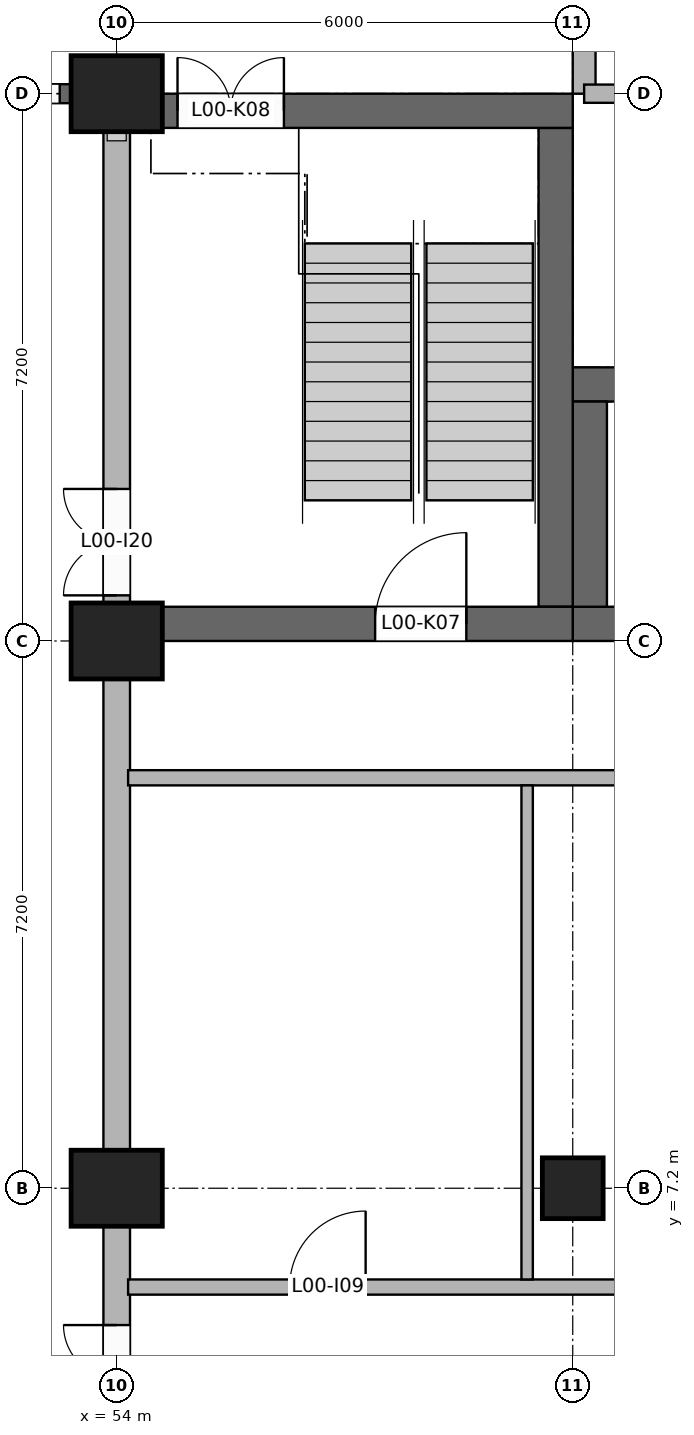
"""IFC4 building model, lengths in metres.
Left out: names, types, materials, properties, quantities, classifications, styles, units other than length and angle.
Written with IfcOpenShell. Run it as: python <this file> out.ifc"""

import sys

from ifc_helpers import new_model, si_unit, direction, frame, frame_2d, origin, origin_2d, place, context, subcontext, project, spatial, rectangle, extrude, element, fill, save


model = new_model("IFC4")
c1 = context("Model", 3, precision=1e-05, world=origin(), true_north=direction((0.0, 1.0)))
c2 = subcontext(c1, "Body", "Model", "MODEL_VIEW")
j1 = project(units=[si_unit("LENGTHUNIT", "METRE"), si_unit("PLANEANGLEUNIT", "RADIAN")], contexts=[c1])
p1 = place(None, origin())
s1 = spatial("IfcSite", under=j1, at=p1, CompositionType="ELEMENT")
p2 = place(p1, origin())
s2 = spatial("IfcBuilding", under=s1, at=p2, CompositionType="ELEMENT")
p3 = place(p2, origin())
s3 = spatial("IfcBuildingStorey", under=s2, at=p3, CompositionType="ELEMENT", Elevation=0.0)
p4 = place(p3, frame((54.6, 14.625, 0.0), z_axis=(0.0, 0.0, 1.0), x_axis=(1.0, 0.0, 0.0)))
e1 = element("IfcWall", 1, at=p4, inside=s3, PredefinedType="SHEAR", context=c2, shape_type="SweptSolid", body=[
    extrude(rectangle(XDim=5.4, YDim=0.45, at=frame_2d((2.7, 0.0))), origin(), (0.0, 0.0, 1.0), 4.0),
])
p5 = place(p4, frame((2.8, 0.0, 0.0)))
e2 = element("IfcOpeningElement", 2, at=p5, cuts=e1, PredefinedType="OPENING", context=c2, shape_type="SweptSolid", body=[
    extrude(rectangle(XDim=1.2, YDim=2.1, at=frame_2d((0.6, 1.05))), frame((0.0, 0.235, 0.0), z_axis=(0.0, -1.0, 0.0), x_axis=(1.0, 0.0, 0.0)), (0.0, 0.0, 1.0), 0.47),
])
p6 = place(p3, frame((54.6, 21.375, 0.0), z_axis=(0.0, 0.0, 1.0), x_axis=(1.0, 0.0, 0.0)))
e3 = element("IfcWall", 3, at=p6, inside=s3, PredefinedType="SHEAR", context=c2, shape_type="SweptSolid", body=[
    extrude(rectangle(XDim=5.4, YDim=0.45, at=frame_2d((2.7, 0.0))), origin(), (0.0, 0.0, 1.0), 4.0),
])
p7 = place(p6, frame((0.2, 0.0, 0.0)))
e4 = element("IfcOpeningElement", 4, at=p7, cuts=e3, PredefinedType="OPENING", context=c2, shape_type="SweptSolid", body=[
    extrude(rectangle(XDim=1.4, YDim=2.1, at=frame_2d((0.7, 1.05))), frame((0.0, 0.235, 0.0), z_axis=(0.0, -1.0, 0.0), x_axis=(1.0, 0.0, 0.0)), (0.0, 0.0, 1.0), 0.47),
])
p8 = place(p3, frame((59.775, 14.85, 0.0), z_axis=(0.0, 0.0, 1.0), x_axis=(0.0, 1.0, 0.0)))
e5 = element("IfcWall", 5, at=p8, inside=s3, PredefinedType="SHEAR", context=c2, shape_type="SweptSolid", body=[
    extrude(rectangle(XDim=6.3, YDim=0.45, at=frame_2d((3.15, 0.0))), origin(), (0.0, 0.0, 1.0), 4.0),
])
p9 = place(p3, frame((60.0, 14.625, 0.0), z_axis=(0.0, 0.0, 1.0), x_axis=(1.0, 0.0, 0.0)))
e6 = element("IfcWall", 6, at=p9, inside=s3, PredefinedType="SHEAR", context=c2, shape_type="SweptSolid", body=[
    extrude(rectangle(XDim=3.0, YDim=0.45, at=frame_2d((1.5, 0.0))), origin(), (0.0, 0.0, 1.0), 4.2),
])
p10 = place(p9, frame((0.95, 0.0, 0.0)))
e7 = element("IfcOpeningElement", 7, at=p10, cuts=e6, PredefinedType="OPENING", context=c2, shape_type="SweptSolid", body=[
    extrude(rectangle(XDim=1.1, YDim=2.1, at=frame_2d((0.55, 1.05))), frame((0.0, 0.235, 0.0), z_axis=(0.0, -1.0, 0.0), x_axis=(1.0, 0.0, 0.0)), (0.0, 0.0, 1.0), 0.47),
])
p11 = place(p3, frame((60.0, 17.775, 0.0), z_axis=(0.0, 0.0, 1.0), x_axis=(1.0, 0.0, 0.0)))
e8 = element("IfcWall", 8, at=p11, inside=s3, PredefinedType="SHEAR", context=c2, shape_type="SweptSolid", body=[
    extrude(rectangle(XDim=3.0, YDim=0.45, at=frame_2d((1.5, 0.0))), origin(), (0.0, 0.0, 1.0), 4.2),
])
for number, where, z_axis, x_axis in (
    (9, (60.0, 14.625, -1.7), (0.0, 0.0, 1.0), (1.0, 0.0, 0.0)),
    (10, (60.0, 17.775, -1.7), (0.0, 0.0, 1.0), (1.0, 0.0, 0.0)),
):
    element("IfcWall", number, at=place(p3, frame(where, z_axis=z_axis, x_axis=x_axis)), inside=s3, PredefinedType="SHEAR", context=c2, shape_type="SweptSolid", body=[
        extrude(rectangle(XDim=3.0, YDim=0.45, at=frame_2d((1.5, 0.0))), origin(), (0.0, 0.0, 1.0), 1.7),
    ])
p12 = place(p3, frame((60.225, 14.85, -1.7), z_axis=(0.0, 0.0, 1.0), x_axis=(0.0, 1.0, 0.0)))
e11 = element("IfcWall", 11, at=p12, inside=s3, PredefinedType="SHEAR", context=c2, shape_type="SweptSolid", body=[
    extrude(rectangle(XDim=2.7, YDim=0.45, at=frame_2d((1.35, 0.0))), origin(), (0.0, 0.0, 1.0), 1.7),
])
p13 = place(p3, frame((60.0, 7.2, -0.25), z_axis=(0.0, 0.0, 1.0), x_axis=(1.0, 0.0, 0.0)))
e12 = element("IfcColumn", 12, at=p13, inside=s3, PredefinedType="COLUMN", context=c2, shape_type="SweptSolid", body=[
    extrude(rectangle(XDim=0.8, YDim=0.8, at=origin_2d()), origin(), (0.0, 0.0, 1.0), 4.25),
])
for number, where, z_axis, x_axis in (
    (13, (54.0, 7.2, -0.25), (0.0, 0.0, 1.0), (1.0, 0.0, 0.0)),
    (14, (54.0, 14.4, -0.25), (0.0, 0.0, 1.0), (1.0, 0.0, 0.0)),
    (15, (54.0, 21.6, -0.25), (0.0, 0.0, 1.0), (1.0, 0.0, 0.0)),
):
    element("IfcColumn", number, at=place(p3, frame(where, z_axis=z_axis, x_axis=x_axis)), inside=s3, PredefinedType="COLUMN", context=c2, shape_type="SweptSolid", body=[
        extrude(rectangle(XDim=1.2, YDim=1.0, at=origin_2d()), origin(), (0.0, 0.0, 1.0), 4.45),
    ])
p14 = place(p3, frame((54.0, 0.5, 0.0), z_axis=(0.0, 0.0, 1.0), x_axis=(0.0, 1.0, 0.0)))
e16 = element("IfcWall", 16, at=p14, inside=s3, PredefinedType="SOLIDWALL", context=c2, shape_type="SweptSolid", body=[
    extrude(rectangle(XDim=6.2, YDim=0.35, at=frame_2d((3.1, 0.0))), origin(), (0.0, 0.0, 1.0), 4.2),
])
p15 = place(p14, frame((3.5, 0.0, 0.0)))
e17 = element("IfcOpeningElement", 17, at=p15, cuts=e16, PredefinedType="OPENING", context=c2, shape_type="SweptSolid", body=[
    extrude(rectangle(XDim=1.4, YDim=2.1, at=frame_2d((0.7, 1.05))), frame((0.0, 0.185, 0.0), z_axis=(0.0, -1.0, 0.0), x_axis=(1.0, 0.0, 0.0)), (0.0, 0.0, 1.0), 0.37),
])
p16 = place(p3, frame((54.0, 7.7, 0.0), z_axis=(0.0, 0.0, 1.0), x_axis=(0.0, 1.0, 0.0)))
e18 = element("IfcWall", 18, at=p16, inside=s3, PredefinedType="SOLIDWALL", context=c2, shape_type="SweptSolid", body=[
    extrude(rectangle(XDim=6.2, YDim=0.35, at=frame_2d((3.1, 0.0))), origin(), (0.0, 0.0, 1.0), 4.2),
])
p17 = place(p3, frame((54.0, 14.9, 0.0), z_axis=(0.0, 0.0, 1.0), x_axis=(0.0, 1.0, 0.0)))
e19 = element("IfcWall", 19, at=p17, inside=s3, PredefinedType="SOLIDWALL", context=c2, shape_type="SweptSolid", body=[
    extrude(rectangle(XDim=6.2, YDim=0.35, at=frame_2d((3.1, 0.0))), origin(), (0.0, 0.0, 1.0), 4.2),
])
p18 = place(p17, frame((0.1, 0.0, 0.0)))
e20 = element("IfcOpeningElement", 20, at=p18, cuts=e19, PredefinedType="OPENING", context=c2, shape_type="SweptSolid", body=[
    extrude(rectangle(XDim=1.4, YDim=2.1, at=frame_2d((0.7, 1.05))), frame((0.0, 0.185, 0.0), z_axis=(0.0, -1.0, 0.0), x_axis=(1.0, 0.0, 0.0)), (0.0, 0.0, 1.0), 0.37),
])
p19 = place(p3, frame((48.6, 21.6, 0.0), z_axis=(0.0, 0.0, 1.0), x_axis=(1.0, 0.0, 0.0)))
e21 = element("IfcWall", 21, at=p19, inside=s3, PredefinedType="SOLIDWALL", context=c2, shape_type="SweptSolid", body=[
    extrude(rectangle(XDim=4.8, YDim=0.25, at=frame_2d((2.4, 0.0))), origin(), (0.0, 0.0, 1.0), 5.4),
])
p20 = place(p19, frame((0.15, 0.0, 0.0)))
e22 = element("IfcOpeningElement", 22, at=p20, cuts=e21, PredefinedType="OPENING", context=c2, shape_type="SweptSolid", body=[
    extrude(rectangle(XDim=4.5, YDim=4.8, at=frame_2d((2.25, 2.4))), frame((0.0, 0.135, 0.0), z_axis=(0.0, -1.0, 0.0), x_axis=(1.0, 0.0, 0.0)), (0.0, 0.0, 1.0), 0.27),
])
p21 = place(p3, frame((60.15, 21.6, 0.0), z_axis=(0.0, 0.0, 1.0), x_axis=(0.0, 1.0, 0.0)))
e23 = element("IfcWall", 23, at=p21, inside=s3, PredefinedType="SOLIDWALL", context=c2, shape_type="SweptSolid", body=[
    extrude(rectangle(XDim=6.1, YDim=0.3, at=frame_2d((3.05, 0.0))), origin(), (0.0, 0.0, 1.0), 3.2),
])
p22 = place(p21, frame((0.625, 0.0, 0.0)))
e24 = element("IfcOpeningElement", 24, at=p22, cuts=e23, PredefinedType="OPENING", context=c2, shape_type="SweptSolid", body=[
    extrude(rectangle(XDim=1.8, YDim=2.4, at=frame_2d((0.9, 1.2))), frame((0.0, 0.16, 0.0), z_axis=(0.0, -1.0, 0.0), x_axis=(1.0, 0.0, 0.0)), (0.0, 0.0, 1.0), 0.32),
])
p23 = place(p3, frame((59.4, 6.0, 0.0), z_axis=(0.0, 0.0, 1.0), x_axis=(0.0, 1.0, 0.0)))
e25 = element("IfcWall", 25, at=p23, inside=s3, PredefinedType="PARTITIONING", context=c2, shape_type="SweptSolid", body=[
    extrude(rectangle(XDim=6.5, YDim=0.15, at=frame_2d((3.25, 0.0))), origin(), (0.0, 0.0, 1.0), 3.2),
])
p24 = place(p3, frame((54.15, 5.9, 0.0), z_axis=(0.0, 0.0, 1.0), x_axis=(1.0, 0.0, 0.0)))
e26 = element("IfcWall", 26, at=p24, inside=s3, PredefinedType="PARTITIONING", context=c2, shape_type="SweptSolid", body=[
    extrude(rectangle(XDim=10.25, YDim=0.2, at=frame_2d((5.125, 0.0))), origin(), (0.0, 0.0, 1.0), 3.1),
])
p25 = place(p24, frame((2.125, 0.0, 0.0)))
e27 = element("IfcOpeningElement", 27, at=p25, cuts=e26, PredefinedType="OPENING", context=c2, shape_type="SweptSolid", body=[
    extrude(rectangle(XDim=1.0, YDim=2.1, at=frame_2d((0.5, 1.05))), frame((0.0, 0.11, 0.0), z_axis=(0.0, -1.0, 0.0), x_axis=(1.0, 0.0, 0.0)), (0.0, 0.0, 1.0), 0.22),
])
p26 = place(p3, frame((54.15, 12.6, 0.0), z_axis=(0.0, 0.0, 1.0), x_axis=(1.0, 0.0, 0.0)))
e28 = element("IfcWall", 28, at=p26, inside=s3, PredefinedType="PARTITIONING", context=c2, shape_type="SweptSolid", body=[
    extrude(rectangle(XDim=10.25, YDim=0.2, at=frame_2d((5.125, 0.0))), origin(), (0.0, 0.0, 1.0), 3.1),
])
p27 = place(p3, frame((60.15, 21.6, 0.0), z_axis=(0.0, 0.0, 1.0), x_axis=(1.0, 0.0, 0.0)))
e29 = element("IfcWall", 29, at=p27, inside=s3, PredefinedType="PARTITIONING", context=c2, shape_type="SweptSolid", body=[
    extrude(rectangle(XDim=5.45, YDim=0.24, at=frame_2d((2.725, 0.0))), origin(), (0.0, 0.0, 1.0), 3.2),
])
p28 = place(p20, origin())
e30 = element("IfcDoor", 30, at=p28, inside=s3, OperationType="ROLLINGUP", PredefinedType="DOOR", context=c2, shape_type="SweptSolid", body=[
    extrude(rectangle(XDim=4.5, YDim=4.8, at=frame_2d((2.25, 2.4))), frame((0.0, 0.025, 0.0), z_axis=(0.0, -1.0, 0.0), x_axis=(1.0, 0.0, 0.0)), (0.0, 0.0, 1.0), 0.05),
])
fill(e22, e30)
p29 = place(p5, origin())
e31 = element("IfcDoor", 31, at=p29, inside=s3, OperationType="SINGLE_SWING_RIGHT", PredefinedType="DOOR", context=c2, shape_type="SweptSolid", body=[
    extrude(rectangle(XDim=1.2, YDim=2.1, at=frame_2d((0.6, 1.05))), frame((0.0, 0.025, 0.0), z_axis=(0.0, -1.0, 0.0), x_axis=(1.0, 0.0, 0.0)), (0.0, 0.0, 1.0), 0.05),
])
fill(e2, e31)
p30 = place(p7, origin())
e32 = element("IfcDoor", 32, at=p30, inside=s3, OperationType="DOUBLE_DOOR_SINGLE_SWING", PredefinedType="DOOR", context=c2, shape_type="SweptSolid", body=[
    extrude(rectangle(XDim=1.4, YDim=2.1, at=frame_2d((0.7, 1.05))), frame((0.0, 0.025, 0.0), z_axis=(0.0, -1.0, 0.0), x_axis=(1.0, 0.0, 0.0)), (0.0, 0.0, 1.0), 0.05),
])
fill(e4, e32)
p31 = place(p25, origin())
e33 = element("IfcDoor", 33, at=p31, inside=s3, OperationType="SINGLE_SWING_RIGHT", PredefinedType="DOOR", context=c2, shape_type="SweptSolid", body=[
    extrude(rectangle(XDim=1.0, YDim=2.1, at=frame_2d((0.5, 1.05))), frame((0.0, 0.025, 0.0), z_axis=(0.0, -1.0, 0.0), x_axis=(1.0, 0.0, 0.0)), (0.0, 0.0, 1.0), 0.05),
])
fill(e27, e33)
p32 = place(p18, origin())
e34 = element("IfcDoor", 34, at=p32, inside=s3, OperationType="DOUBLE_DOOR_DOUBLE_SWING", PredefinedType="DOOR", context=c2, shape_type="SweptSolid", body=[
    extrude(rectangle(XDim=1.4, YDim=2.1, at=frame_2d((0.7, 1.05))), frame((0.0, 0.025, 0.0), z_axis=(0.0, -1.0, 0.0), x_axis=(1.0, 0.0, 0.0)), (0.0, 0.0, 1.0), 0.05),
])
fill(e20, e34)
p33 = place(p15, origin())
e35 = element("IfcDoor", 35, at=p33, inside=s3, OperationType="DOUBLE_DOOR_DOUBLE_SWING", PredefinedType="DOOR", context=c2, shape_type="SweptSolid", body=[
    extrude(rectangle(XDim=1.4, YDim=2.1, at=frame_2d((0.7, 1.05))), frame((0.0, 0.025, 0.0), z_axis=(0.0, -1.0, 0.0), x_axis=(1.0, 0.0, 0.0)), (0.0, 0.0, 1.0), 0.05),
])
fill(e17, e35)
save(model, sys.argv[1])
